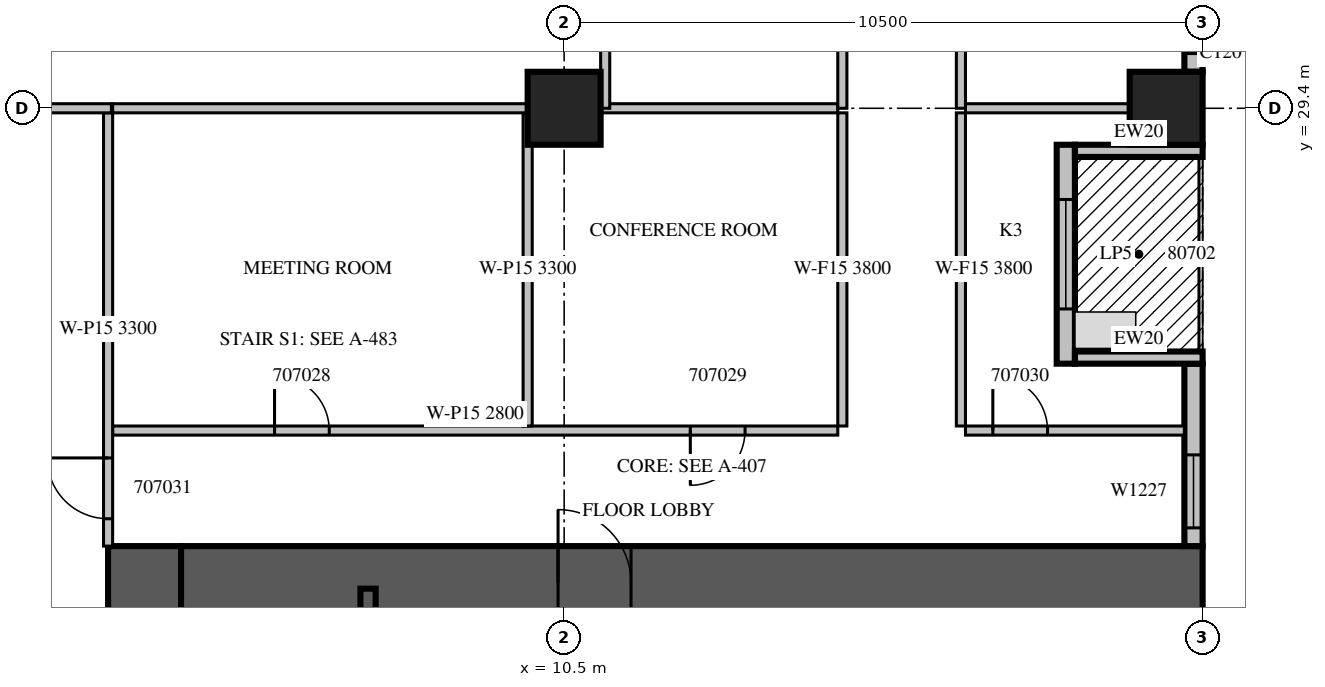
"""IFC4 building model, lengths in metres.
Left out: names, types, materials, properties, quantities, classifications, styles, units other than length and angle.
Written with IfcOpenShell. Run it as: python <this file> out.ifc"""

import sys

from ifc_helpers import new_model, si_unit, direction, frame, frame_2d, origin, origin_2d, place, context, subcontext, project, spatial, rectangle, extrude, source, transform, mapped, element, fill, save


model = new_model("IFC4")
c1 = context("Model", 3, precision=1e-05, world=origin(), true_north=direction((0.0, 1.0)))
c2 = subcontext(c1, "Body", "Model", "MODEL_VIEW")
j1 = project(units=[si_unit("LENGTHUNIT", "METRE"), si_unit("PLANEANGLEUNIT", "RADIAN")], contexts=[c1])
p1 = place(None, origin())
s1 = spatial("IfcSite", under=j1, at=p1, CompositionType="ELEMENT")
p2 = place(p1, origin())
s2 = spatial("IfcBuilding", under=s1, at=p2, CompositionType="ELEMENT")
p3 = place(p2, frame((0.0, 0.0, 40.5)))
s3 = spatial("IfcBuildingStorey", under=s2, at=p3, CompositionType="ELEMENT", Elevation=40.5)
m1 = source(origin(), c2, "Body", "SweptSolid", [
    extrude(rectangle(XDim=1.2, YDim=1.2, at=origin_2d()), origin(), (0.0, 0.0, 1.0), 4.2),
])
for number, where, z_axis, x_axis in (
    (1, (10.5, 29.4, 0.0), (0.0, 0.0, 1.0), (1.0, 0.0, 0.0)),
    (2, (20.4, 29.4, 0.0), (0.0, 0.0, 1.0), (1.0, 0.0, 0.0)),
):
    element("IfcColumn", number, at=place(p3, frame(where, z_axis=z_axis, x_axis=x_axis)), inside=s3, PredefinedType="COLUMN", context=c2, shape_type="MappedRepresentation", body=[
        mapped(m1, transform((0.0, 0.0, 0.0), scale=1.0)),
    ])
p4 = place(p3, frame((3.6, 4.2, 0.0), z_axis=(0.0, 0.0, 1.0), x_axis=(0.0, 1.0, 0.0)))
e3 = element("IfcWall", 3, at=p4, inside=s3, PredefinedType="SHEAR", context=c2, shape_type="SweptSolid", body=[
    extrude(rectangle(XDim=18.0, YDim=1.2, at=frame_2d((9.0, 0.0))), origin(), (0.0, 0.0, 1.0), 4.2),
])
m2 = source(origin(), c2, "Body", "SweptSolid", [
    extrude(rectangle(XDim=2.2, YDim=2.1, at=frame_2d((1.1, 1.05))), frame((0.0, 0.61, 0.0), z_axis=(0.0, -1.0, 0.0), x_axis=(1.0, 0.0, 0.0)), (0.0, 0.0, 1.0), 1.22),
])
p5 = place(p4, frame((4.2, 0.0, 0.0)))
e4 = element("IfcOpeningElement", 4, at=p5, cuts=e3, PredefinedType="OPENING", context=c2, shape_type="MappedRepresentation", body=[
    mapped(m2, transform((0.0, 0.0, 0.0), scale=1.0)),
])
m3 = source(origin(), c2, "Body", "SweptSolid", [
    extrude(rectangle(XDim=16.8, YDim=1.2, at=frame_2d((8.4, 0.0))), origin(), (0.0, 0.0, 1.0), 4.2),
])
p6 = place(p3, frame((4.2, 21.6, 0.0), z_axis=(0.0, 0.0, 1.0), x_axis=(1.0, 0.0, 0.0)))
e5 = element("IfcWall", 5, at=p6, inside=s3, PredefinedType="SHEAR", context=c2, shape_type="MappedRepresentation", body=[
    mapped(m3, transform((0.0, 0.0, 0.0), scale=1.0)),
])
m4 = source(origin(), c2, "Body", "SweptSolid", [
    extrude(rectangle(XDim=1.2, YDim=2.1, at=frame_2d((0.6, 1.05))), frame((0.0, 0.61, 0.0), z_axis=(0.0, -1.0, 0.0), x_axis=(1.0, 0.0, 0.0)), (0.0, 0.0, 1.0), 1.22),
])
p7 = place(p6, frame((6.2, 0.0, 0.0)))
e6 = element("IfcOpeningElement", 6, at=p7, cuts=e5, PredefinedType="OPENING", context=c2, shape_type="MappedRepresentation", body=[
    mapped(m4, transform((0.0, 0.0, 0.0), scale=1.0)),
])
p8 = place(p3, frame((20.85, 22.2, 0.0), z_axis=(0.0, 0.0, 1.0), x_axis=(0.0, 1.0, 0.0)))
e7 = element("IfcWall", 7, at=p8, inside=s3, PredefinedType="STANDARD", context=c2, shape_type="SweptSolid", body=[
    extrude(rectangle(XDim=3.0, YDim=0.3, at=frame_2d((1.5, 0.0))), origin(), (0.0, 0.0, 1.0), 3.8),
])
m5 = source(origin(), c2, "Body", "SweptSolid", [
    extrude(rectangle(XDim=1.2, YDim=2.7, at=frame_2d((0.6, 1.35))), frame((0.0, 0.16, 0.0), z_axis=(0.0, -1.0, 0.0), x_axis=(1.0, 0.0, 0.0)), (0.0, 0.0, 1.0), 0.32),
])
p9 = place(p8, frame((0.3, 0.0, 0.6)))
e8 = element("IfcOpeningElement", 8, at=p9, cuts=e7, PredefinedType="OPENING", context=c2, shape_type="MappedRepresentation", body=[
    mapped(m5, transform((0.0, 0.0, 0.0), scale=1.0)),
])
m6 = source(origin(), c2, "Body", "SweptSolid", [
    extrude(rectangle(XDim=3.6, YDim=0.3, at=frame_2d((1.8, 0.0))), origin(), (0.0, 0.0, 1.0), 3.8),
])
p10 = place(p3, frame((18.75, 25.2, 0.0), z_axis=(0.0, 0.0, 1.0), x_axis=(0.0, 1.0, 0.0)))
e9 = element("IfcWall", 9, at=p10, inside=s3, PredefinedType="STANDARD", context=c2, shape_type="MappedRepresentation", body=[
    mapped(m6, transform((0.0, 0.0, 0.0), scale=1.0)),
])
m7 = source(origin(), c2, "Body", "SweptSolid", [
    extrude(rectangle(XDim=1.8, YDim=2.4, at=frame_2d((0.9, 1.2))), frame((0.0, 0.16, 0.0), z_axis=(0.0, -1.0, 0.0), x_axis=(1.0, 0.0, 0.0)), (0.0, 0.0, 1.0), 0.32),
])
p11 = place(p10, frame((0.9, 0.0, 0.0)))
e10 = element("IfcOpeningElement", 10, at=p11, cuts=e9, PredefinedType="OPENING", context=c2, shape_type="MappedRepresentation", body=[
    mapped(m7, transform((0.0, 0.0, 0.0), scale=1.0)),
])
p12 = place(p3, frame((21.0, 25.3, 0.0), z_axis=(0.0, 0.0, 1.0), x_axis=(-1.0, 0.0, 0.0)))
e11 = element("IfcWall", 11, at=p12, inside=s3, PredefinedType="STANDARD", context=c2, shape_type="SweptSolid", body=[
    extrude(rectangle(XDim=2.1, YDim=0.2, at=frame_2d((1.05, 0.0))), origin(), (0.0, 0.0, 1.0), 3.8),
])
m8 = source(origin(), c2, "Body", "SweptSolid", [
    extrude(rectangle(XDim=2.1, YDim=0.2, at=frame_2d((1.05, 0.0))), origin(), (0.0, 0.0, 1.0), 3.8),
])
p13 = place(p3, frame((21.0, 28.7, 0.0), z_axis=(0.0, 0.0, 1.0), x_axis=(-1.0, 0.0, 0.0)))
e12 = element("IfcWall", 12, at=p13, inside=s3, PredefinedType="STANDARD", context=c2, shape_type="MappedRepresentation", body=[
    mapped(m8, transform((0.0, 0.0, 0.0), scale=1.0)),
])
m9 = source(origin(), c2, "Body", "SweptSolid", [
    extrude(rectangle(XDim=7.2, YDim=0.3, at=frame_2d((3.6, 0.0))), origin(), (0.0, 0.0, 1.0), 3.8),
])
p14 = place(p3, frame((20.85, 30.0, 0.0), z_axis=(0.0, 0.0, 1.0), x_axis=(0.0, 1.0, 0.0)))
e13 = element("IfcWall", 13, at=p14, inside=s3, PredefinedType="STANDARD", context=c2, shape_type="MappedRepresentation", body=[
    mapped(m9, transform((0.0, 0.0, 0.0), scale=1.0)),
])
m10 = source(origin(), c2, "Body", "SweptSolid", [
    extrude(rectangle(XDim=2.4, YDim=2.7, at=frame_2d((1.2, 1.35))), frame((0.0, 0.16, 0.0), z_axis=(0.0, -1.0, 0.0), x_axis=(1.0, 0.0, 0.0)), (0.0, 0.0, 1.0), 0.32),
])
p15 = place(p14, frame((0.3, 0.0, 0.6)))
e14 = element("IfcOpeningElement", 14, at=p15, cuts=e13, PredefinedType="OPENING", context=c2, shape_type="MappedRepresentation", body=[
    mapped(m10, transform((0.0, 0.0, 0.0), scale=1.0)),
])
p16 = place(p14, frame((4.199, 0.0, 0.6)))
e15 = element("IfcOpeningElement", 15, at=p16, cuts=e13, PredefinedType="OPENING", context=c2, shape_type="MappedRepresentation", body=[
    mapped(m5, transform((0.0, 0.0, 0.0), scale=1.0)),
])
p17 = place(p3, frame((7.275, 14.9, 0.0), z_axis=(0.0, 0.0, 1.0), x_axis=(0.0, 1.0, 0.0)))
e16 = element("IfcWall", 16, at=p17, inside=s3, PredefinedType="SOLIDWALL", context=c2, shape_type="SweptSolid", body=[
    extrude(rectangle(XDim=6.6, YDim=0.25, at=frame_2d((3.3, 0.0))), origin(), (0.0, 0.0, 1.0), 3.8),
])
m11 = source(origin(), c2, "Body", "SweptSolid", [
    extrude(rectangle(XDim=1.1, YDim=2.1, at=frame_2d((0.55, 1.05))), frame((0.0, 0.135, 0.0), z_axis=(0.0, -1.0, 0.0), x_axis=(1.0, 0.0, 0.0)), (0.0, 0.0, 1.0), 0.27),
])
p18 = place(p17, frame((0.15, 0.0, 0.0)))
e17 = element("IfcOpeningElement", 17, at=p18, cuts=e16, PredefinedType="OPENING", context=c2, shape_type="MappedRepresentation", body=[
    mapped(m11, transform((0.0, 0.0, 0.0), scale=1.0)),
])
p19 = place(p3, frame((3.075, 24.1, 0.0), z_axis=(0.0, 0.0, 1.0), x_axis=(1.0, 0.0, 0.0)))
e18 = element("IfcWall", 18, at=p19, inside=s3, PredefinedType="PARTITIONING", context=c2, shape_type="SweptSolid", body=[
    extrude(rectangle(XDim=11.925, YDim=0.15, at=frame_2d((5.963, 0.0))), origin(), (0.0, 0.0, 1.0), 2.8),
])
m12 = source(origin(), c2, "Body", "SweptSolid", [
    extrude(rectangle(XDim=0.9, YDim=2.1, at=frame_2d((0.45, 1.05))), frame((0.0, 0.085, 0.0), z_axis=(0.0, -1.0, 0.0), x_axis=(1.0, 0.0, 0.0)), (0.0, 0.0, 1.0), 0.17),
])
p20 = place(p19, frame((2.663, 0.0, 0.0)))
e19 = element("IfcOpeningElement", 19, at=p20, cuts=e18, PredefinedType="OPENING", context=c2, shape_type="MappedRepresentation", body=[
    mapped(m12, transform((0.0, 0.0, 0.0), scale=1.0)),
])
p21 = place(p19, frame((9.5, 0.0, 0.0)))
e20 = element("IfcOpeningElement", 20, at=p21, cuts=e18, PredefinedType="OPENING", context=c2, shape_type="MappedRepresentation", body=[
    mapped(m12, transform((0.0, 0.0, 0.0), scale=1.0)),
])
m13 = source(origin(), c2, "Body", "SweptSolid", [
    extrude(rectangle(XDim=3.6, YDim=0.15, at=frame_2d((1.8, 0.0))), origin(), (0.0, 0.0, 1.0), 3.8),
])
p22 = place(p3, frame((17.1, 24.1, 0.0), z_axis=(0.0, 0.0, 1.0), x_axis=(1.0, 0.0, 0.0)))
e21 = element("IfcWall", 21, at=p22, inside=s3, PredefinedType="PARTITIONING", context=c2, shape_type="MappedRepresentation", body=[
    mapped(m13, transform((0.0, 0.0, 0.0), scale=1.0)),
])
p23 = place(p22, frame((0.45, 0.0, 0.0)))
e22 = element("IfcOpeningElement", 22, at=p23, cuts=e21, PredefinedType="OPENING", context=c2, shape_type="MappedRepresentation", body=[
    mapped(m12, transform((0.0, 0.0, 0.0), scale=1.0)),
])
p24 = place(p3, frame((9.9, 24.175, 0.0), z_axis=(0.0, 0.0, 1.0), x_axis=(0.0, 1.0, 0.0)))
e23 = element("IfcWall", 23, at=p24, inside=s3, PredefinedType="PARTITIONING", context=c2, shape_type="SweptSolid", body=[
    extrude(rectangle(XDim=5.15, YDim=0.15, at=frame_2d((2.575, 0.0))), origin(), (0.0, 0.0, 1.0), 3.3),
])
m14 = source(origin(), c2, "Body", "SweptSolid", [
    extrude(rectangle(XDim=5.15, YDim=0.15, at=frame_2d((2.575, 0.0))), origin(), (0.0, 0.0, 1.0), 3.8),
])
for number, where, z_axis, x_axis in (
    (24, (15.075, 24.175, 0.0), (0.0, 0.0, 1.0), (0.0, 1.0, 0.0)),
    (25, (17.025, 29.325, 0.0), (0.0, 0.0, 1.0), (0.0, -1.0, 0.0)),
):
    element("IfcWall", number, at=place(p3, frame(where, z_axis=z_axis, x_axis=x_axis)), inside=s3, PredefinedType="PARTITIONING", context=c2, shape_type="MappedRepresentation", body=[
        mapped(m14, transform((0.0, 0.0, 0.0), scale=1.0)),
    ])
m15 = source(origin(), c2, "Body", "SweptSolid", [
    extrude(rectangle(XDim=6.826, YDim=0.15, at=frame_2d((3.413, 0.0))), origin(), (0.0, 0.0, 1.0), 3.8),
])
p25 = place(p3, frame((9.901, 29.4, 0.0), z_axis=(0.0, 0.0, 1.0), x_axis=(-1.0, 0.0, 0.0)))
e26 = element("IfcWall", 26, at=p25, inside=s3, PredefinedType="PARTITIONING", context=c2, shape_type="MappedRepresentation", body=[
    mapped(m15, transform((0.0, 0.0, 0.0), scale=1.0)),
])
m16 = source(origin(), c2, "Body", "SweptSolid", [
    extrude(rectangle(XDim=3.901, YDim=0.15, at=frame_2d((1.95, 0.0))), origin(), (0.0, 0.0, 1.0), 3.8),
])
p26 = place(p3, frame((15.0, 29.4, 0.0), z_axis=(0.0, 0.0, 1.0), x_axis=(-1.0, 0.0, 0.0)))
e27 = element("IfcWall", 27, at=p26, inside=s3, PredefinedType="PARTITIONING", context=c2, shape_type="MappedRepresentation", body=[
    mapped(m16, transform((0.0, 0.0, 0.0), scale=1.0)),
])
m17 = source(origin(), c2, "Body", "SweptSolid", [
    extrude(rectangle(XDim=2.701, YDim=0.15, at=frame_2d((1.351, 0.0))), origin(), (0.0, 0.0, 1.0), 3.8),
])
p27 = place(p3, frame((19.801, 29.4, 0.0), z_axis=(0.0, 0.0, 1.0), x_axis=(-1.0, 0.0, 0.0)))
e28 = element("IfcWall", 28, at=p27, inside=s3, PredefinedType="PARTITIONING", context=c2, shape_type="MappedRepresentation", body=[
    mapped(m17, transform((0.0, 0.0, 0.0), scale=1.0)),
])
p28 = place(p3, frame((3.0, 29.325, 0.0), z_axis=(0.0, 0.0, 1.0), x_axis=(0.0, -1.0, 0.0)))
e29 = element("IfcWall", 29, at=p28, inside=s3, PredefinedType="PARTITIONING", context=c2, shape_type="SweptSolid", body=[
    extrude(rectangle(XDim=7.125, YDim=0.15, at=frame_2d((3.562, 0.0))), origin(), (0.0, 0.0, 1.0), 3.3),
])
m18 = source(origin(), c2, "Body", "SweptSolid", [
    extrude(rectangle(XDim=1.0, YDim=2.1, at=frame_2d((0.5, 1.05))), frame((0.0, 0.085, 0.0), z_axis=(0.0, -1.0, 0.0), x_axis=(1.0, 0.0, 0.0)), (0.0, 0.0, 1.0), 0.17),
])
p29 = place(p28, frame((5.675, 0.0, 0.0)))
e30 = element("IfcOpeningElement", 30, at=p29, cuts=e29, PredefinedType="OPENING", context=c2, shape_type="MappedRepresentation", body=[
    mapped(m18, transform((0.0, 0.0, 0.0), scale=1.0)),
])
m19 = source(origin(), c2, "Body", "SweptSolid", [
    extrude(rectangle(XDim=1.856, YDim=0.15, at=frame_2d((0.928, 0.0))), origin(), (0.0, 0.0, 1.0), 3.8),
])
p30 = place(p3, frame((3.055, 29.4, 0.0), z_axis=(0.0, 0.0, 1.0), x_axis=(-1.0, 0.0, 0.0)))
e31 = element("IfcWall", 31, at=p30, inside=s3, PredefinedType="PARTITIONING", context=c2, shape_type="MappedRepresentation", body=[
    mapped(m19, transform((0.0, 0.0, 0.0), scale=1.0)),
])
m20 = source(origin(), c2, "Body", "SweptSolid", [
    extrude(rectangle(XDim=8.4, YDim=0.15, at=frame_2d((4.2, 0.0))), origin(), (0.0, 0.0, 1.0), 3.8),
])
p31 = place(p3, frame((11.175, 29.4, 0.0), z_axis=(0.0, 0.0, 1.0), x_axis=(0.0, 1.0, 0.0)))
e32 = element("IfcWall", 32, at=p31, inside=s3, PredefinedType="PARTITIONING", context=c2, shape_type="MappedRepresentation", body=[
    mapped(m20, transform((0.0, 0.0, 0.0), scale=1.0)),
])
m21 = source(origin(), c2, "Body", "SweptSolid", [
    extrude(rectangle(XDim=1.1, YDim=2.1, at=frame_2d((0.55, 1.05))), frame((0.0, 0.085, 0.0), z_axis=(0.0, -1.0, 0.0), x_axis=(1.0, 0.0, 0.0)), (0.0, 0.0, 1.0), 0.17),
])
p32 = place(p31, frame((1.467, 0.0, 0.0)))
e33 = element("IfcOpeningElement", 33, at=p32, cuts=e32, PredefinedType="OPENING", context=c2, shape_type="MappedRepresentation", body=[
    mapped(m21, transform((0.0, 0.0, 0.0), scale=1.0)),
])
p33 = place(p3, frame((15.075, 29.4, 0.0), z_axis=(0.0, 0.0, 1.0), x_axis=(0.0, 1.0, 0.0)))
e34 = element("IfcWall", 34, at=p33, inside=s3, PredefinedType="PARTITIONING", context=c2, shape_type="MappedRepresentation", body=[
    mapped(m20, transform((0.0, 0.0, 0.0), scale=1.0)),
])
p34 = place(p33, frame((1.154, 0.0, 0.0)))
e35 = element("IfcOpeningElement", 35, at=p34, cuts=e34, PredefinedType="OPENING", context=c2, shape_type="MappedRepresentation", body=[
    mapped(m21, transform((0.0, 0.0, 0.0), scale=1.0)),
])
p35 = place(p33, frame((4.224, 0.0, 0.0)))
e36 = element("IfcOpeningElement", 36, at=p35, cuts=e34, PredefinedType="OPENING", context=c2, shape_type="MappedRepresentation", body=[
    mapped(m12, transform((0.0, 0.0, 0.0), scale=1.0)),
])
p36 = place(p33, frame((6.719, 0.0, 0.0)))
e37 = element("IfcOpeningElement", 37, at=p36, cuts=e34, PredefinedType="OPENING", context=c2, shape_type="MappedRepresentation", body=[
    mapped(m12, transform((0.0, 0.0, 0.0), scale=1.0)),
])
p37 = place(p3, frame((17.025, 61.02, 0.0), z_axis=(0.0, 0.0, 1.0), x_axis=(0.0, -1.0, 0.0)))
e38 = element("IfcWall", 38, at=p37, inside=s3, PredefinedType="PARTITIONING", context=c2, shape_type="SweptSolid", body=[
    extrude(rectangle(XDim=31.62, YDim=0.15, at=frame_2d((15.81, 0.0))), origin(), (0.0, 0.0, 1.0), 3.3),
])
p38 = place(p37, frame((29.263, 0.0, 0.0)))
e39 = element("IfcOpeningElement", 39, at=p38, cuts=e38, PredefinedType="OPENING", context=c2, shape_type="MappedRepresentation", body=[
    mapped(m18, transform((0.0, 0.0, 0.0), scale=1.0)),
])
p39 = place(p37, frame((25.951, 0.0, 0.0)))
e40 = element("IfcOpeningElement", 40, at=p39, cuts=e38, PredefinedType="OPENING", context=c2, shape_type="MappedRepresentation", body=[
    mapped(m18, transform((0.0, 0.0, 0.0), scale=1.0)),
])
p40 = place(p37, frame((23.608, 0.0, 0.0)))
e41 = element("IfcOpeningElement", 41, at=p40, cuts=e38, PredefinedType="OPENING", context=c2, shape_type="MappedRepresentation", body=[
    mapped(m18, transform((0.0, 0.0, 0.0), scale=1.0)),
])
p41 = place(p37, frame((20.62, 0.0, 0.0)))
e42 = element("IfcOpeningElement", 42, at=p41, cuts=e38, PredefinedType="OPENING", context=c2, shape_type="MappedRepresentation", body=[
    mapped(m18, transform((0.0, 0.0, 0.0), scale=1.0)),
])
p42 = place(p37, frame((16.293, 0.0, 0.0)))
e43 = element("IfcOpeningElement", 43, at=p42, cuts=e38, PredefinedType="OPENING", context=c2, shape_type="MappedRepresentation", body=[
    mapped(m18, transform((0.0, 0.0, 0.0), scale=1.0)),
])
p43 = place(p37, frame((12.314, 0.0, 0.0)))
e44 = element("IfcOpeningElement", 44, at=p43, cuts=e38, PredefinedType="OPENING", context=c2, shape_type="MappedRepresentation", body=[
    mapped(m18, transform((0.0, 0.0, 0.0), scale=1.0)),
])
p44 = place(p37, frame((9.501, 0.0, 0.0)))
e45 = element("IfcOpeningElement", 45, at=p44, cuts=e38, PredefinedType="OPENING", context=c2, shape_type="MappedRepresentation", body=[
    mapped(m18, transform((0.0, 0.0, 0.0), scale=1.0)),
])
p45 = place(p37, frame((6.186, 0.0, 0.0)))
e46 = element("IfcOpeningElement", 46, at=p45, cuts=e38, PredefinedType="OPENING", context=c2, shape_type="MappedRepresentation", body=[
    mapped(m18, transform((0.0, 0.0, 0.0), scale=1.0)),
])
p46 = place(p37, frame((1.679, 0.0, 0.0)))
e47 = element("IfcOpeningElement", 47, at=p46, cuts=e38, PredefinedType="OPENING", context=c2, shape_type="MappedRepresentation", body=[
    mapped(m18, transform((0.0, 0.0, 0.0), scale=1.0)),
])
m22 = source(origin(), c2, "Body", "SweptSolid", [
    extrude(rectangle(XDim=1.2, YDim=2.7, at=frame_2d((0.6, 1.35))), frame((0.0, 0.03, 0.0), z_axis=(0.0, -1.0, 0.0), x_axis=(1.0, 0.0, 0.0)), (0.0, 0.0, 1.0), 0.06),
])
p47 = place(p9, origin())
e48 = element("IfcWindow", 48, at=p47, inside=s3, PartitioningType="SINGLE_PANEL", PredefinedType="WINDOW", context=c2, shape_type="MappedRepresentation", body=[
    mapped(m22, transform((0.0, 0.0, 0.0), scale=1.0)),
])
fill(e8, e48)
m23 = source(origin(), c2, "Body", "SweptSolid", [
    extrude(rectangle(XDim=1.8, YDim=2.4, at=frame_2d((0.9, 1.2))), frame((0.0, 0.025, 0.0), z_axis=(0.0, -1.0, 0.0), x_axis=(1.0, 0.0, 0.0)), (0.0, 0.0, 1.0), 0.05),
])
p48 = place(p11, origin())
e49 = element("IfcDoor", 49, at=p48, inside=s3, OperationType="SLIDING_TO_LEFT", PredefinedType="DOOR", context=c2, shape_type="MappedRepresentation", body=[
    mapped(m23, transform((0.0, 0.0, 0.0), scale=1.0)),
])
fill(e10, e49)
m24 = source(origin(), c2, "Body", "SweptSolid", [
    extrude(rectangle(XDim=2.4, YDim=2.7, at=frame_2d((1.2, 1.35))), frame((0.0, 0.03, 0.0), z_axis=(0.0, -1.0, 0.0), x_axis=(1.0, 0.0, 0.0)), (0.0, 0.0, 1.0), 0.06),
])
p49 = place(p15, origin())
e50 = element("IfcWindow", 50, at=p49, inside=s3, PartitioningType="SINGLE_PANEL", PredefinedType="WINDOW", context=c2, shape_type="MappedRepresentation", body=[
    mapped(m24, transform((0.0, 0.0, 0.0), scale=1.0)),
])
fill(e14, e50)
m25 = source(origin(), c2, "Body", "SweptSolid", [
    extrude(rectangle(XDim=1.2, YDim=2.1, at=frame_2d((0.6, 1.05))), frame((0.0, 0.025, 0.0), z_axis=(0.0, -1.0, 0.0), x_axis=(1.0, 0.0, 0.0)), (0.0, 0.0, 1.0), 0.05),
])
p50 = place(p7, origin())
e51 = element("IfcDoor", 51, at=p50, inside=s3, OperationType="SINGLE_SWING_LEFT", PredefinedType="DOOR", context=c2, shape_type="MappedRepresentation", body=[
    mapped(m25, transform((0.0, 0.0, 0.0), scale=1.0)),
])
fill(e6, e51)
m26 = source(origin(), c2, "Body", "SweptSolid", [
    extrude(rectangle(XDim=0.9, YDim=2.1, at=frame_2d((0.45, 1.05))), frame((0.0, 0.025, 0.0), z_axis=(0.0, -1.0, 0.0), x_axis=(1.0, 0.0, 0.0)), (0.0, 0.0, 1.0), 0.05),
])
p51 = place(p20, origin())
e52 = element("IfcDoor", 52, at=p51, inside=s3, OperationType="SINGLE_SWING_LEFT", PredefinedType="DOOR", context=c2, shape_type="MappedRepresentation", body=[
    mapped(m26, transform((0.0, 0.0, 0.0), scale=1.0)),
])
fill(e19, e52)
p52 = place(p21, origin())
e53 = element("IfcDoor", 53, at=p52, inside=s3, OperationType="SINGLE_SWING_RIGHT", PredefinedType="DOOR", context=c2, shape_type="MappedRepresentation", body=[
    mapped(m26, transform((0.0, 0.0, 0.0), scale=1.0)),
])
fill(e20, e53)
p53 = place(p23, origin())
e54 = element("IfcDoor", 54, at=p53, inside=s3, OperationType="SINGLE_SWING_LEFT", PredefinedType="DOOR", context=c2, shape_type="MappedRepresentation", body=[
    mapped(m26, transform((0.0, 0.0, 0.0), scale=1.0)),
])
fill(e22, e54)
m27 = source(origin(), c2, "Body", "SweptSolid", [
    extrude(rectangle(XDim=1.0, YDim=2.1, at=frame_2d((0.5, 1.05))), frame((0.0, 0.025, 0.0), z_axis=(0.0, -1.0, 0.0), x_axis=(1.0, 0.0, 0.0)), (0.0, 0.0, 1.0), 0.05),
])
p54 = place(p29, origin())
e55 = element("IfcDoor", 55, at=p54, inside=s3, OperationType="SINGLE_SWING_RIGHT", PredefinedType="DOOR", context=c2, shape_type="MappedRepresentation", body=[
    mapped(m27, transform((0.0, 0.0, 0.0), scale=1.0)),
])
fill(e30, e55)
save(model, sys.argv[1])
